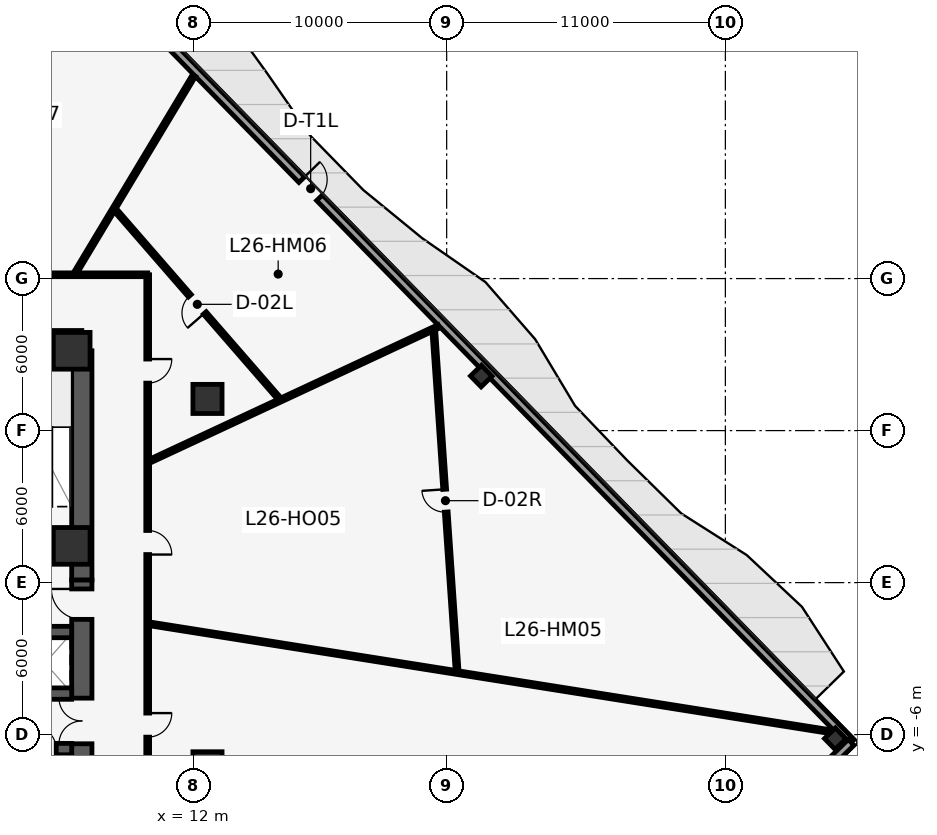
"""IFC4 building model, lengths in metres.
Left out: names, types, materials, properties, quantities, classifications, styles, units other than length and angle.
Written with IfcOpenShell. Run it as: python <this file> out.ifc"""

import sys

from ifc_helpers import new_model, si_unit, direction, frame, frame_2d, origin, origin_2d, place, context, subcontext, project, spatial, rectangle, hollow_rectangle, extrude, element, fill, save


model = new_model("IFC4")
c1 = context("Model", 3, precision=1e-05, world=origin(), true_north=direction((0.0, 1.0)))
c2 = subcontext(c1, "Body", "Model", "MODEL_VIEW")
j1 = project(units=[si_unit("LENGTHUNIT", "METRE"), si_unit("PLANEANGLEUNIT", "RADIAN")], contexts=[c1])
p1 = place(None, origin())
s1 = spatial("IfcSite", under=j1, at=p1, CompositionType="ELEMENT")
p2 = place(p1, origin())
s2 = spatial("IfcBuilding", under=s1, at=p2, CompositionType="ELEMENT")
p3 = place(p2, frame((0.0, 0.0, 115.0)))
s3 = spatial("IfcBuildingStorey", under=s2, at=p3, CompositionType="ELEMENT", Elevation=115.0)
p4 = place(p3, frame((-7.6, 9.55, 0.0), z_axis=(0.0, 0.0, 1.0), x_axis=(1.0, 0.0, 0.0)))
e1 = element("IfcWall", 1, at=p4, inside=s3, PredefinedType="SHEAR", context=c2, shape_type="SweptSolid", body=[
    extrude(rectangle(XDim=15.2, YDim=0.8, at=frame_2d((7.6, 0.0))), origin(), (0.0, 0.0, 1.0), 3.75),
])
p5 = place(p4, frame((7.05, 0.0, 0.0)))
e2 = element("IfcOpeningElement", 2, at=p5, cuts=e1, PredefinedType="OPENING", context=c2, shape_type="SweptSolid", body=[
    extrude(rectangle(XDim=1.1, YDim=2.15, at=frame_2d((0.55, 1.075))), frame((0.0, 0.41, 0.0), z_axis=(0.0, -1.0, 0.0), x_axis=(1.0, 0.0, 0.0)), (0.0, 0.0, 1.0), 0.82),
])
p6 = place(p4, frame((4.38, 0.0, 0.0)))
e3 = element("IfcOpeningElement", 3, at=p6, cuts=e1, PredefinedType="OPENING", context=c2, shape_type="SweptSolid", body=[
    extrude(rectangle(XDim=0.88, YDim=2.15, at=frame_2d((0.44, 1.075))), frame((0.0, 0.41, 0.0), z_axis=(0.0, -1.0, 0.0), x_axis=(1.0, 0.0, 0.0)), (0.0, 0.0, 1.0), 0.82),
])
p7 = place(p4, frame((9.94, 0.0, 0.0)))
e4 = element("IfcOpeningElement", 4, at=p7, cuts=e1, PredefinedType="OPENING", context=c2, shape_type="SweptSolid", body=[
    extrude(rectangle(XDim=0.88, YDim=2.15, at=frame_2d((0.44, 1.075))), frame((0.0, 0.41, 0.0), z_axis=(0.0, -1.0, 0.0), x_axis=(1.0, 0.0, 0.0)), (0.0, 0.0, 1.0), 0.82),
])
p8 = place(p3, frame((-7.2, 1.225, 0.0), z_axis=(0.0, 0.0, 1.0), x_axis=(1.0, 0.0, 0.0)))
e5 = element("IfcWall", 5, at=p8, inside=s3, PredefinedType="SHEAR", context=c2, shape_type="SweptSolid", body=[
    extrude(rectangle(XDim=14.4, YDim=0.45, at=frame_2d((7.2, 0.0))), origin(), (0.0, 0.0, 1.0), 3.75),
])
p9 = place(p8, frame((3.795, 0.0, 0.0)))
e6 = element("IfcOpeningElement", 6, at=p9, cuts=e5, PredefinedType="OPENING", context=c2, shape_type="SweptSolid", body=[
    extrude(rectangle(XDim=1.25, YDim=2.25, at=frame_2d((0.625, 1.125))), frame((0.0, 0.235, 0.0), z_axis=(0.0, -1.0, 0.0), x_axis=(1.0, 0.0, 0.0)), (0.0, 0.0, 1.0), 0.47),
])
p10 = place(p8, frame((9.355, 0.0, 0.0)))
e7 = element("IfcOpeningElement", 7, at=p10, cuts=e5, PredefinedType="OPENING", context=c2, shape_type="SweptSolid", body=[
    extrude(rectangle(XDim=1.25, YDim=2.25, at=frame_2d((0.625, 1.125))), frame((0.0, 0.235, 0.0), z_axis=(0.0, -1.0, 0.0), x_axis=(1.0, 0.0, 0.0)), (0.0, 0.0, 1.0), 0.47),
])
p11 = place(p8, frame((1.075, 0.0, 0.0)))
e8 = element("IfcOpeningElement", 8, at=p11, cuts=e5, PredefinedType="OPENING", context=c2, shape_type="SweptSolid", body=[
    extrude(rectangle(XDim=1.1, YDim=2.15, at=frame_2d((0.55, 1.075))), frame((0.0, 0.235, 0.0), z_axis=(0.0, -1.0, 0.0), x_axis=(1.0, 0.0, 0.0)), (0.0, 0.0, 1.0), 0.47),
])
p12 = place(p8, frame((12.225, 0.0, 0.0)))
e9 = element("IfcOpeningElement", 9, at=p12, cuts=e5, PredefinedType="OPENING", context=c2, shape_type="SweptSolid", body=[
    extrude(rectangle(XDim=1.1, YDim=2.15, at=frame_2d((0.55, 1.075))), frame((0.0, 0.235, 0.0), z_axis=(0.0, -1.0, 0.0), x_axis=(1.0, 0.0, 0.0)), (0.0, 0.0, 1.0), 0.47),
])
p13 = place(p3, frame((7.6, 0.1, 0.0), z_axis=(0.0, 0.0, 1.0), x_axis=(0.0, 1.0, 0.0)))
e10 = element("IfcWall", 10, at=p13, inside=s3, PredefinedType="SHEAR", context=c2, shape_type="SweptSolid", body=[
    extrude(rectangle(XDim=9.05, YDim=0.8, at=frame_2d((4.525, 0.0))), origin(), (0.0, 0.0, 1.0), 3.75),
])
p14 = place(p3, frame((7.6, -8.85, 0.0), z_axis=(0.0, 0.0, 1.0), x_axis=(0.0, 1.0, 0.0)))
e11 = element("IfcWall", 11, at=p14, inside=s3, PredefinedType="SHEAR", context=c2, shape_type="SweptSolid", body=[
    extrude(rectangle(XDim=8.95, YDim=0.8, at=frame_2d((4.475, 0.0))), origin(), (0.0, 0.0, 1.0), 3.75),
])
p15 = place(p14, frame((2.49, 0.0, 0.0)))
e12 = element("IfcOpeningElement", 12, at=p15, cuts=e11, PredefinedType="OPENING", context=c2, shape_type="SweptSolid", body=[
    extrude(rectangle(XDim=1.8, YDim=2.2, at=frame_2d((0.9, 1.1))), frame((0.0, 0.41, 0.0), z_axis=(0.0, -1.0, 0.0), x_axis=(1.0, 0.0, 0.0)), (0.0, 0.0, 1.0), 0.82),
])
p16 = place(p14, frame((7.4, 0.0, 0.0)))
e13 = element("IfcOpeningElement", 13, at=p16, cuts=e11, PredefinedType="OPENING", context=c2, shape_type="SweptSolid", body=[
    extrude(rectangle(XDim=1.2, YDim=2.15, at=frame_2d((0.6, 1.075))), frame((0.0, 0.41, 0.0), z_axis=(0.0, -1.0, 0.0), x_axis=(1.0, 0.0, 0.0)), (0.0, 0.0, 1.0), 0.82),
])
p17 = place(p3, frame((-7.2, -1.95, 0.0), z_axis=(0.0, 0.0, 1.0), x_axis=(1.0, 0.0, 0.0)))
e14 = element("IfcWall", 14, at=p17, inside=s3, PredefinedType="SHEAR", context=c2, shape_type="SweptSolid", body=[
    extrude(rectangle(XDim=14.4, YDim=0.45, at=frame_2d((7.2, 0.0))), origin(), (0.0, 0.0, 1.0), 3.75),
])
p18 = place(p3, frame((-7.2, -4.38, 0.0), z_axis=(0.0, 0.0, 1.0), x_axis=(1.0, 0.0, 0.0)))
e15 = element("IfcWall", 15, at=p18, inside=s3, PredefinedType="SHEAR", context=c2, shape_type="SweptSolid", body=[
    extrude(rectangle(XDim=14.4, YDim=0.45, at=frame_2d((7.2, 0.0))), origin(), (0.0, 0.0, 1.0), 3.75),
])
p19 = place(p18, frame((0.5, 0.0, 0.0)))
e16 = element("IfcOpeningElement", 16, at=p19, cuts=e15, PredefinedType="OPENING", context=c2, shape_type="SweptSolid", body=[
    extrude(rectangle(XDim=1.1, YDim=2.2, at=frame_2d((0.55, 1.1))), frame((0.0, 0.235, 0.0), z_axis=(0.0, -1.0, 0.0), x_axis=(1.0, 0.0, 0.0)), (0.0, 0.0, 1.0), 0.47),
])
p20 = place(p18, frame((2.55, 0.0, 0.0)))
e17 = element("IfcOpeningElement", 17, at=p20, cuts=e15, PredefinedType="OPENING", context=c2, shape_type="SweptSolid", body=[
    extrude(rectangle(XDim=1.1, YDim=2.2, at=frame_2d((0.55, 1.1))), frame((0.0, 0.235, 0.0), z_axis=(0.0, -1.0, 0.0), x_axis=(1.0, 0.0, 0.0)), (0.0, 0.0, 1.0), 0.47),
])
p21 = place(p18, frame((4.6, 0.0, 0.0)))
e18 = element("IfcOpeningElement", 18, at=p21, cuts=e15, PredefinedType="OPENING", context=c2, shape_type="SweptSolid", body=[
    extrude(rectangle(XDim=1.1, YDim=2.2, at=frame_2d((0.55, 1.1))), frame((0.0, 0.235, 0.0), z_axis=(0.0, -1.0, 0.0), x_axis=(1.0, 0.0, 0.0)), (0.0, 0.0, 1.0), 0.47),
])
p22 = place(p18, frame((6.3, 0.0, 0.0)))
e19 = element("IfcOpeningElement", 19, at=p22, cuts=e15, PredefinedType="OPENING", context=c2, shape_type="SweptSolid", body=[
    extrude(rectangle(XDim=1.1, YDim=2.2, at=frame_2d((0.55, 1.1))), frame((0.0, 0.235, 0.0), z_axis=(0.0, -1.0, 0.0), x_axis=(1.0, 0.0, 0.0)), (0.0, 0.0, 1.0), 0.47),
])
p23 = place(p3, frame((-7.2, -6.57, 0.0), z_axis=(0.0, 0.0, 1.0), x_axis=(1.0, 0.0, 0.0)))
e20 = element("IfcWall", 20, at=p23, inside=s3, PredefinedType="SHEAR", context=c2, shape_type="SweptSolid", body=[
    extrude(rectangle(XDim=14.4, YDim=0.45, at=frame_2d((7.2, 0.0))), origin(), (0.0, 0.0, 1.0), 3.75),
])
p24 = place(p23, frame((12.91, 0.0, 0.0)))
e21 = element("IfcOpeningElement", 21, at=p24, cuts=e20, PredefinedType="OPENING", context=c2, shape_type="SweptSolid", body=[
    extrude(rectangle(XDim=0.88, YDim=2.15, at=frame_2d((0.44, 1.075))), frame((0.0, 0.235, 0.0), z_axis=(0.0, -1.0, 0.0), x_axis=(1.0, 0.0, 0.0)), (0.0, 0.0, 1.0), 0.47),
])
for number, where, z_axis, x_axis in (
    (22, (7.2, 1.45, 0.0), (0.0, 0.0, 1.0), (1.0, 0.0, 0.0)),
    (23, (7.2, 9.15, 0.0), (0.0, 0.0, 1.0), (1.0, 0.0, 0.0)),
):
    element("IfcColumn", number, at=place(p3, frame(where, z_axis=z_axis, x_axis=x_axis)), inside=s3, PredefinedType="COLUMN", context=c2, shape_type="SweptSolid", body=[
        extrude(rectangle(XDim=1.45, YDim=1.45, at=origin_2d()), origin(), (0.0, 0.0, 1.0), 4.0),
    ])
for number, where, z_axis, x_axis in (
    (24, (12.56, -7.25, 0.0), (0.0, 0.0, 1.0), (1.0, 0.0, 0.0)),
    (25, (12.56, 7.25, 0.0), (0.0, 0.0, 1.0), (1.0, 0.0, 0.0)),
):
    element("IfcColumn", number, at=place(p3, frame(where, z_axis=z_axis, x_axis=x_axis)), inside=s3, PredefinedType="COLUMN", context=c2, shape_type="SweptSolid", body=[
        extrude(rectangle(XDim=1.15, YDim=1.15, at=origin_2d()), origin(), (0.0, 0.0, 1.0), 4.0),
    ])
for number, where, z_axis, x_axis in (
    (26, (37.337, -6.16, 0.0), (0.0, 0.0, 1.0), (-0.699, 0.716, 0.0)),
    (27, (23.365, 8.151, 0.0), (0.0, 0.0, 1.0), (-0.699, 0.716, 0.0)),
):
    element("IfcColumn", number, at=place(p3, frame(where, z_axis=z_axis, x_axis=x_axis)), inside=s3, PredefinedType="COLUMN", context=c2, shape_type="SweptSolid", body=[
        extrude(hollow_rectangle(XDim=0.6, YDim=0.6, WallThickness=0.04, at=origin_2d()), origin(), (0.0, 0.0, 1.0), 4.0),
    ])
p25 = place(p3, frame((-4.698, 37.402, 0.0), z_axis=(0.0, 0.0, 1.0), x_axis=(0.698490621109, -0.715619208954, 0.0)))
e28 = element("IfcWall", 28, at=p25, inside=s3, PredefinedType="STANDARD", context=c2, shape_type="SweptSolid", body=[
    extrude(rectangle(XDim=61.076, YDim=0.32, at=frame_2d((30.538, 0.0))), origin(), (0.0, 0.0, 1.0), 3.75),
])
p26 = place(p25, frame((30.038, 0.0, 0.0)))
e29 = element("IfcOpeningElement", 29, at=p26, cuts=e28, PredefinedType="OPENING", context=c2, shape_type="SweptSolid", body=[
    extrude(rectangle(XDim=1.0, YDim=2.15, at=frame_2d((0.5, 1.075))), frame((0.0, 0.17, 0.0), z_axis=(0.0, -1.0, 0.0), x_axis=(1.0, 0.0, 0.0)), (0.0, 0.0, 1.0), 0.34),
])
p27 = place(p3, frame((37.963, -6.305, 0.0), z_axis=(0.0, 0.0, 1.0), x_axis=(-0.71562223009, -0.698487525873, 0.0)))
e30 = element("IfcWall", 30, at=p27, inside=s3, PredefinedType="STANDARD", context=c2, shape_type="SweptSolid", body=[
    extrude(rectangle(XDim=3.933, YDim=0.32, at=frame_2d((1.966, 0.0))), origin(), (0.0, 0.0, 1.0), 3.75),
])
p28 = place(p3, frame((-10.2, 12.15, 0.0), z_axis=(0.0, 0.0, 1.0), x_axis=(1.0, 0.0, 0.0)))
e31 = element("IfcWall", 31, at=p28, inside=s3, PredefinedType="PARTITIONING", context=c2, shape_type="SweptSolid", body=[
    extrude(rectangle(XDim=20.4, YDim=0.15, at=frame_2d((10.2, 0.0))), origin(), (0.0, 0.0, 1.0), 3.75),
])
p29 = place(p28, frame((13.081, 0.0, 0.0)))
e32 = element("IfcOpeningElement", 32, at=p29, cuts=e31, PredefinedType="OPENING", context=c2, shape_type="SweptSolid", body=[
    extrude(rectangle(XDim=0.95, YDim=2.15, at=frame_2d((0.475, 1.075))), frame((0.0, 0.085, 0.0), z_axis=(0.0, -1.0, 0.0), x_axis=(1.0, 0.0, 0.0)), (0.0, 0.0, 1.0), 0.17),
])
p30 = place(p28, frame((4.788, 0.0, 0.0)))
e33 = element("IfcOpeningElement", 33, at=p30, cuts=e31, PredefinedType="OPENING", context=c2, shape_type="SweptSolid", body=[
    extrude(rectangle(XDim=0.95, YDim=2.15, at=frame_2d((0.475, 1.075))), frame((0.0, 0.085, 0.0), z_axis=(0.0, -1.0, 0.0), x_axis=(1.0, 0.0, 0.0)), (0.0, 0.0, 1.0), 0.17),
])
p31 = place(p3, frame((10.2, 12.15, 0.0), z_axis=(0.0, 0.0, 1.0), x_axis=(0.0, -1.0, 0.0)))
e34 = element("IfcWall", 34, at=p31, inside=s3, PredefinedType="PARTITIONING", context=c2, shape_type="SweptSolid", body=[
    extrude(rectangle(XDim=24.0, YDim=0.15, at=frame_2d((12.0, 0.0))), origin(), (0.0, 0.0, 1.0), 3.75),
])
p32 = place(p31, frame((17.299, 0.0, 0.0)))
e35 = element("IfcOpeningElement", 35, at=p32, cuts=e34, PredefinedType="OPENING", context=c2, shape_type="SweptSolid", body=[
    extrude(rectangle(XDim=0.95, YDim=2.15, at=frame_2d((0.475, 1.075))), frame((0.0, 0.085, 0.0), z_axis=(0.0, -1.0, 0.0), x_axis=(1.0, 0.0, 0.0)), (0.0, 0.0, 1.0), 0.17),
])
p33 = place(p31, frame((10.092, 0.0, 0.0)))
e36 = element("IfcOpeningElement", 36, at=p33, cuts=e34, PredefinedType="OPENING", context=c2, shape_type="SweptSolid", body=[
    extrude(rectangle(XDim=0.95, YDim=2.15, at=frame_2d((0.475, 1.075))), frame((0.0, 0.085, 0.0), z_axis=(0.0, -1.0, 0.0), x_axis=(1.0, 0.0, 0.0)), (0.0, 0.0, 1.0), 0.17),
])
p34 = place(p31, frame((3.327, 0.0, 0.0)))
e37 = element("IfcOpeningElement", 37, at=p34, cuts=e34, PredefinedType="OPENING", context=c2, shape_type="SweptSolid", body=[
    extrude(rectangle(XDim=0.95, YDim=2.15, at=frame_2d((0.475, 1.075))), frame((0.0, 0.085, 0.0), z_axis=(0.0, -1.0, 0.0), x_axis=(1.0, 0.0, 0.0)), (0.0, 0.0, 1.0), 0.17),
])
p35 = place(p3, frame((10.305, 4.805, 0.0), z_axis=(0.0, 0.0, 1.0), x_axis=(0.906312673918, 0.422607781631, 0.0)))
e38 = element("IfcWall", 38, at=p35, inside=s3, PredefinedType="PARTITIONING", context=c2, shape_type="SweptSolid", body=[
    extrude(rectangle(XDim=12.563, YDim=0.15, at=frame_2d((6.282, 0.0))), origin(), (0.0, 0.0, 1.0), 3.75),
])
p36 = place(p3, frame((7.364, 12.255, 0.0), z_axis=(0.0, 0.0, 1.0), x_axis=(0.515030961147, 0.857171575042, 0.0)))
e39 = element("IfcWall", 39, at=p36, inside=s3, PredefinedType="PARTITIONING", context=c2, shape_type="SweptSolid", body=[
    extrude(rectangle(XDim=9.054, YDim=0.15, at=frame_2d((4.527, 0.0))), origin(), (0.0, 0.0, 1.0), 3.75),
])
p37 = place(p3, frame((10.305, -1.632, 0.0), z_axis=(0.0, 0.0, 1.0), x_axis=(0.987688570565, -0.156433013064, 0.0)))
e40 = element("IfcWall", 40, at=p37, inside=s3, PredefinedType="PARTITIONING", context=c2, shape_type="SweptSolid", body=[
    extrude(rectangle(XDim=27.368, YDim=0.15, at=frame_2d((13.684, 0.0))), origin(), (0.0, 0.0, 1.0), 3.75),
])
p38 = place(p3, frame((22.415, -3.525, 0.0), z_axis=(0.0, 0.0, 1.0), x_axis=(-0.068270897284, 0.997666820429, 0.0)))
e41 = element("IfcWall", 41, at=p38, inside=s3, PredefinedType="PARTITIONING", context=c2, shape_type="SweptSolid", body=[
    extrude(rectangle(XDim=13.55, YDim=0.15, at=frame_2d((6.775, 0.0))), origin(), (0.0, 0.0, 1.0), 3.75),
])
p39 = place(p38, frame((6.325, 0.0, 0.0)))
e42 = element("IfcOpeningElement", 42, at=p39, cuts=e41, PredefinedType="OPENING", context=c2, shape_type="SweptSolid", body=[
    extrude(rectangle(XDim=0.9, YDim=2.1, at=frame_2d((0.45, 1.05))), frame((0.0, 0.085, 0.0), z_axis=(0.0, -1.0, 0.0), x_axis=(1.0, 0.0, 0.0)), (0.0, 0.0, 1.0), 0.17),
])
p40 = place(p3, frame((15.428, 7.222, 0.0), z_axis=(0.0, 0.0, 1.0), x_axis=(-0.656028314667, 0.75473627868, 0.0)))
e43 = element("IfcWall", 43, at=p40, inside=s3, PredefinedType="PARTITIONING", context=c2, shape_type="SweptSolid", body=[
    extrude(rectangle(XDim=9.968, YDim=0.15, at=frame_2d((4.984, 0.0))), origin(), (0.0, 0.0, 1.0), 3.75),
])
p41 = place(p40, frame((4.534, 0.0, 0.0)))
e44 = element("IfcOpeningElement", 44, at=p41, cuts=e43, PredefinedType="OPENING", context=c2, shape_type="SweptSolid", body=[
    extrude(rectangle(XDim=0.9, YDim=2.1, at=frame_2d((0.45, 1.05))), frame((0.0, 0.085, 0.0), z_axis=(0.0, -1.0, 0.0), x_axis=(1.0, 0.0, 0.0)), (0.0, 0.0, 1.0), 0.17),
])
p42 = place(p26, origin())
e45 = element("IfcDoor", 45, at=p42, inside=s3, OperationType="SINGLE_SWING_LEFT", PredefinedType="DOOR", context=c2, shape_type="SweptSolid", body=[
    extrude(rectangle(XDim=1.0, YDim=2.15, at=frame_2d((0.5, 1.075))), frame((0.0, 0.025, 0.0), z_axis=(0.0, -1.0, 0.0), x_axis=(1.0, 0.0, 0.0)), (0.0, 0.0, 1.0), 0.05),
])
fill(e29, e45)
p43 = place(p15, origin())
e46 = element("IfcDoor", 46, at=p43, inside=s3, OperationType="DOUBLE_DOOR_SINGLE_SWING", PredefinedType="DOOR", context=c2, shape_type="SweptSolid", body=[
    extrude(rectangle(XDim=1.8, YDim=2.2, at=frame_2d((0.9, 1.1))), frame((0.0, 0.025, 0.0), z_axis=(0.0, -1.0, 0.0), x_axis=(1.0, 0.0, 0.0)), (0.0, 0.0, 1.0), 0.05),
])
fill(e12, e46)
p44 = place(p16, origin())
e47 = element("IfcDoor", 47, at=p44, inside=s3, OperationType="SINGLE_SWING_RIGHT", PredefinedType="DOOR", context=c2, shape_type="SweptSolid", body=[
    extrude(rectangle(XDim=1.2, YDim=2.15, at=frame_2d((0.6, 1.075))), frame((0.0, 0.025, 0.0), z_axis=(0.0, -1.0, 0.0), x_axis=(1.0, 0.0, 0.0)), (0.0, 0.0, 1.0), 0.05),
])
fill(e13, e47)
p45 = place(p24, origin())
e48 = element("IfcDoor", 48, at=p45, inside=s3, OperationType="SINGLE_SWING_LEFT", PredefinedType="DOOR", context=c2, shape_type="SweptSolid", body=[
    extrude(rectangle(XDim=0.88, YDim=2.15, at=frame_2d((0.44, 1.075))), frame((0.0, 0.025, 0.0), z_axis=(0.0, -1.0, 0.0), x_axis=(1.0, 0.0, 0.0)), (0.0, 0.0, 1.0), 0.05),
])
fill(e21, e48)
p46 = place(p39, origin())
e49 = element("IfcDoor", 49, at=p46, inside=s3, OperationType="SINGLE_SWING_RIGHT", PredefinedType="DOOR", context=c2, shape_type="SweptSolid", body=[
    extrude(rectangle(XDim=0.9, YDim=2.1, at=frame_2d((0.45, 1.05))), frame((0.0, 0.025, 0.0), z_axis=(0.0, -1.0, 0.0), x_axis=(1.0, 0.0, 0.0)), (0.0, 0.0, 1.0), 0.05),
])
fill(e42, e49)
p47 = place(p41, origin())
e50 = element("IfcDoor", 50, at=p47, inside=s3, OperationType="SINGLE_SWING_LEFT", PredefinedType="DOOR", context=c2, shape_type="SweptSolid", body=[
    extrude(rectangle(XDim=0.9, YDim=2.1, at=frame_2d((0.45, 1.05))), frame((0.0, 0.025, 0.0), z_axis=(0.0, -1.0, 0.0), x_axis=(1.0, 0.0, 0.0)), (0.0, 0.0, 1.0), 0.05),
])
fill(e44, e50)
p48 = place(p32, origin())
e51 = element("IfcDoor", 51, at=p48, inside=s3, OperationType="SINGLE_SWING_LEFT", PredefinedType="DOOR", context=c2, shape_type="SweptSolid", body=[
    extrude(rectangle(XDim=0.95, YDim=2.15, at=frame_2d((0.475, 1.075))), frame((0.0, 0.025, 0.0), z_axis=(0.0, -1.0, 0.0), x_axis=(1.0, 0.0, 0.0)), (0.0, 0.0, 1.0), 0.05),
])
fill(e35, e51)
p49 = place(p33, origin())
e52 = element("IfcDoor", 52, at=p49, inside=s3, OperationType="SINGLE_SWING_RIGHT", PredefinedType="DOOR", context=c2, shape_type="SweptSolid", body=[
    extrude(rectangle(XDim=0.95, YDim=2.15, at=frame_2d((0.475, 1.075))), frame((0.0, 0.025, 0.0), z_axis=(0.0, -1.0, 0.0), x_axis=(1.0, 0.0, 0.0)), (0.0, 0.0, 1.0), 0.05),
])
fill(e36, e52)
p50 = place(p34, origin())
e53 = element("IfcDoor", 53, at=p50, inside=s3, OperationType="SINGLE_SWING_LEFT", PredefinedType="DOOR", context=c2, shape_type="SweptSolid", body=[
    extrude(rectangle(XDim=0.95, YDim=2.15, at=frame_2d((0.475, 1.075))), frame((0.0, 0.025, 0.0), z_axis=(0.0, -1.0, 0.0), x_axis=(1.0, 0.0, 0.0)), (0.0, 0.0, 1.0), 0.05),
])
fill(e37, e53)
save(model, sys.argv[1])
